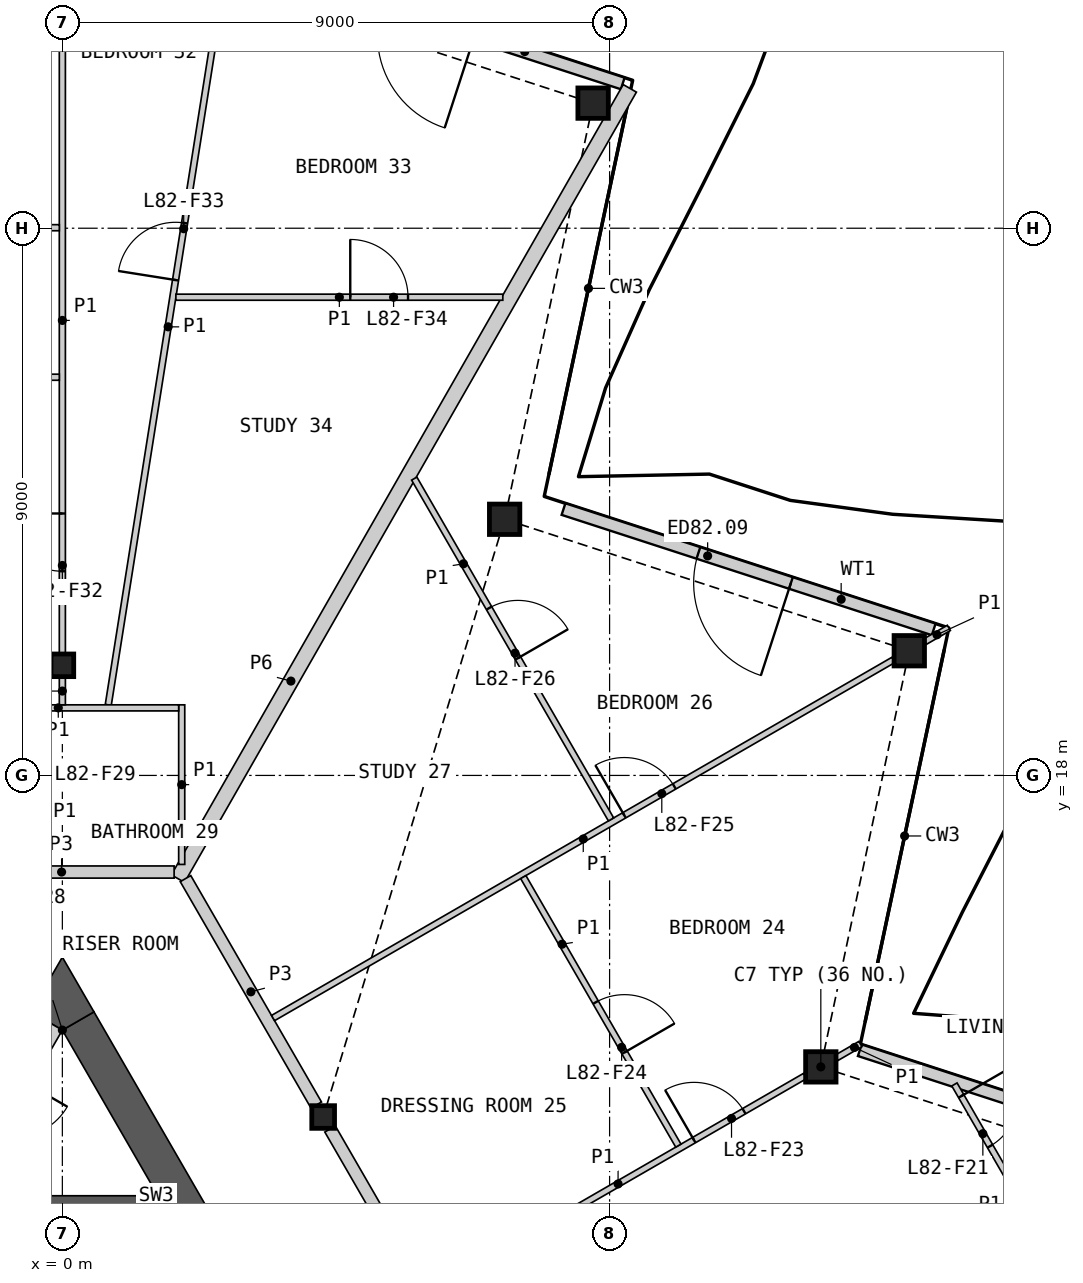
"""IFC4 building model, lengths in metres.
Left out: names, types, materials, properties, quantities, classifications, styles, units other than length and angle.
Written with IfcOpenShell. Run it as: python <this file> out.ifc"""

import sys

from ifc_helpers import new_model, si_unit, direction, frame, frame_2d, origin, origin_2d, place, context, subcontext, project, spatial, polyline, rectangle, hollow_rectangle, i_section, outline, extrude, element, fill, save


model = new_model("IFC4")
c1 = context("Model", 3, precision=1e-05, world=origin(), true_north=direction((0.0, 1.0)))
c2 = subcontext(c1, "Body", "Model", "MODEL_VIEW")
j1 = project(units=[si_unit("LENGTHUNIT", "METRE"), si_unit("PLANEANGLEUNIT", "RADIAN")], contexts=[c1])
p1 = place(None, origin())
s1 = spatial("IfcSite", under=j1, at=p1, CompositionType="ELEMENT")
p2 = place(p1, origin())
s2 = spatial("IfcBuilding", under=s1, at=p2, CompositionType="ELEMENT")
p3 = place(p2, frame((0.0, 0.0, 367.8)))
s3 = spatial("IfcBuildingStorey", under=s2, at=p3, CompositionType="ELEMENT", Elevation=367.8)
for number, where, z_axis, x_axis in (
    (1, (12.474, 13.206, 0.0), (0.0, 0.0, 1.0), (1.0, 0.0, 0.0)),
    (2, (13.929, 20.051, 0.0), (0.0, 0.0, 1.0), (1.0, 0.0, 0.0)),
    (3, (7.274, 22.213, 0.0), (0.0, 0.0, 1.0), (1.0, 0.0, 0.0)),
    (4, (8.729, 29.057, 0.0), (0.0, 0.0, 1.0), (1.0, 0.0, 0.0)),
):
    element("IfcColumn", number, at=place(p3, frame(where, z_axis=z_axis, x_axis=x_axis)), inside=s3, PredefinedType="COLUMN", context=c2, shape_type="SweptSolid", body=[
        extrude(hollow_rectangle(XDim=0.5, YDim=0.5, WallThickness=0.03, at=origin_2d()), origin(), (0.0, 0.0, 1.0), 3.4),
    ])
for number, where, z_axis, x_axis in (
    (5, (0.0, 19.811, 0.0), (0.0, 0.0, 1.0), (1.0, 0.0, 0.0)),
    (6, (4.289, 12.382, 0.0), (0.0, 0.0, 1.0), (1.0, 0.0, 0.0)),
):
    element("IfcColumn", number, at=place(p3, frame(where, z_axis=z_axis, x_axis=x_axis)), inside=s3, PredefinedType="COLUMN", context=c2, shape_type="SweptSolid", body=[
        extrude(i_section(OverallWidth=0.374, OverallDepth=0.372, WebThickness=0.016, FlangeThickness=0.026, at=origin_2d()), origin(), (0.0, 0.0, 1.0), 3.4),
    ])
p4 = place(p3, frame((19.467, 11.416, 0.0), z_axis=(0.0, 0.0, 1.0), x_axis=(-0.951057706878, 0.309013330114, 0.0)))
e7 = element("IfcWall", 7, at=p4, inside=s3, PredefinedType="SOLIDWALL", context=c2, shape_type="SweptSolid", body=[
    extrude(rectangle(XDim=6.678, YDim=0.2, at=frame_2d((3.339, 0.0))), origin(), (0.0, 0.0, 1.0), 2.634),
])
p5 = place(p4, frame((2.402, 0.0, 0.0)))
e8 = element("IfcOpeningElement", 8, at=p5, cuts=e7, PredefinedType="OPENING", context=c2, shape_type="SweptSolid", body=[
    extrude(rectangle(XDim=1.6, YDim=2.25, at=frame_2d((0.8, 1.125))), frame((0.0, 0.11, 0.0), z_axis=(0.0, -1.0, 0.0), x_axis=(1.0, 0.0, 0.0)), (0.0, 0.0, 1.0), 0.22),
])
p6 = place(p3, frame((14.331, 20.402, 0.0), z_axis=(0.0, 0.0, 1.0), x_axis=(-0.951058447414, 0.30901105094, 0.0)))
e9 = element("IfcWall", 9, at=p6, inside=s3, PredefinedType="SOLIDWALL", context=c2, shape_type="SweptSolid", body=[
    extrude(rectangle(XDim=6.402, YDim=0.2, at=frame_2d((3.201, 0.0))), origin(), (0.0, 0.0, 1.0), 2.634),
])
p7 = place(p6, frame((2.469, 0.0, 0.0)))
e10 = element("IfcOpeningElement", 10, at=p7, cuts=e9, PredefinedType="OPENING", context=c2, shape_type="SweptSolid", body=[
    extrude(rectangle(XDim=1.6, YDim=2.25, at=frame_2d((0.8, 1.125))), frame((0.0, 0.11, 0.0), z_axis=(0.0, -1.0, 0.0), x_axis=(1.0, 0.0, 0.0)), (0.0, 0.0, 1.0), 0.22),
])
p8 = place(p3, frame((9.216, 29.381, 0.0), z_axis=(0.0, 0.0, 1.0), x_axis=(-0.951058150748, 0.309011964002, 0.0)))
e11 = element("IfcWall", 11, at=p8, inside=s3, PredefinedType="SOLIDWALL", context=c2, shape_type="SweptSolid", body=[
    extrude(rectangle(XDim=6.779, YDim=0.2, at=frame_2d((3.389, 0.0))), origin(), (0.0, 0.0, 1.0), 2.634),
])
p9 = place(p8, frame((2.559, 0.0, 0.0)))
e12 = element("IfcOpeningElement", 12, at=p9, cuts=e11, PredefinedType="OPENING", context=c2, shape_type="SweptSolid", body=[
    extrude(rectangle(XDim=1.6, YDim=2.25, at=frame_2d((0.8, 1.125))), frame((0.0, 0.11, 0.0), z_axis=(0.0, -1.0, 0.0), x_axis=(1.0, 0.0, 0.0)), (0.0, 0.0, 1.0), 0.22),
])
p10 = place(p3, origin())
e13 = element("IfcWall", 13, at=p10, inside=s3, PredefinedType="SHEAR", context=c2, shape_type="SweptSolid", body=[
    extrude(outline(polyline([(1.544, 5.237), (1.544, 11.087), (1.294, 10.837), (1.294, 5.237), (1.544, 5.237)])), origin(), (0.0, 0.0, 1.0), 3.1),
])
p11 = place(p3, origin())
e14 = element("IfcWall", 14, at=p11, inside=s3, PredefinedType="SHEAR", context=c2, shape_type="SweptSolid", body=[
    extrude(outline(polyline([(1.544, 11.087), (-1.544, 11.087), (-1.294, 10.837), (1.294, 10.837), (1.544, 11.087)])), origin(), (0.0, 0.0, 1.0), 3.1),
])
p12 = place(p3, frame((2.361, 10.322, 0.0), z_axis=(0.0, 0.0, 1.0), x_axis=(-0.500000735859, 0.866024978935, 0.0)))
e15 = element("IfcWall", 15, at=p12, inside=s3, PredefinedType="SHEAR", context=c2, shape_type="SweptSolid", body=[
    extrude(rectangle(XDim=4.202, YDim=0.6, at=frame_2d((2.101, 0.0))), origin(), (0.0, 0.0, 1.0), 3.1),
])
p13 = place(p3, origin())
e16 = element("IfcWall", 16, at=p13, inside=s3, PredefinedType="SHEAR", context=c2, shape_type="SweptSolid", body=[
    extrude(outline(polyline([(0.0, 13.811), (-0.52, 14.111), (0.0, 15.011), (0.52, 14.111), (0.0, 13.811)])), origin(), (0.0, 0.0, 1.0), 3.1),
])
p14 = place(p3, frame((-0.26, 13.961, 0.0), z_axis=(0.0, 0.0, 1.0), x_axis=(-0.49997936161, -0.866037319036, 0.0)))
e17 = element("IfcWall", 17, at=p14, inside=s3, PredefinedType="SHEAR", context=c2, shape_type="SweptSolid", body=[
    extrude(rectangle(XDim=2.66, YDim=0.6, at=frame_2d((1.33, 0.0))), origin(), (0.0, 0.0, 1.0), 3.1),
])
p15 = place(p14, frame((1.05, 0.0, 0.0)))
e18 = element("IfcOpeningElement", 18, at=p15, cuts=e17, PredefinedType="OPENING", context=c2, shape_type="SweptSolid", body=[
    extrude(rectangle(XDim=1.0, YDim=2.1, at=frame_2d((0.5, 1.05))), frame((0.0, 0.31, 0.0), z_axis=(0.0, -1.0, 0.0), x_axis=(1.0, 0.0, 0.0)), (0.0, 0.0, 1.0), 0.62),
])
p16 = place(p3, frame((1.901, 16.302, 0.0), z_axis=(0.0, 0.0, 1.0), x_axis=(0.496368960053, 0.86811166073, 0.0)))
e19 = element("IfcWall", 19, at=p16, inside=s3, PredefinedType="PARTITIONING", context=c2, shape_type="SweptSolid", body=[
    extrude(rectangle(XDim=14.972, YDim=0.25, at=frame_2d((7.486, 0.0))), origin(), (0.0, 0.0, 1.0), 2.33),
])
p17 = place(p3, frame((4.403, 12.185, 0.0), z_axis=(0.0, 0.0, 1.0), x_axis=(0.499992155518, -0.866029932751, 0.0)))
e20 = element("IfcWall", 20, at=p17, inside=s3, PredefinedType="PARTITIONING", context=c2, shape_type="SweptSolid", body=[
    extrude(rectangle(XDim=8.123, YDim=0.2, at=frame_2d((4.062, 0.0))), origin(), (0.0, 0.0, 1.0), 3.1),
])
p18 = place(p17, frame((3.762, 0.0, 0.0)))
e21 = element("IfcOpeningElement", 21, at=p18, cuts=e20, PredefinedType="OPENING", context=c2, shape_type="SweptSolid", body=[
    extrude(rectangle(XDim=1.0, YDim=2.1, at=frame_2d((0.5, 1.05))), frame((0.0, 0.11, 0.0), z_axis=(0.0, -1.0, 0.0), x_axis=(1.0, 0.0, 0.0)), (0.0, 0.0, 1.0), 0.22),
])
p19 = place(p3, frame((2.025, 16.303, 0.0), z_axis=(0.0, 0.0, 1.0), x_axis=(0.500004215162, -0.866022970146, 0.0)))
e22 = element("IfcWall", 22, at=p19, inside=s3, PredefinedType="PARTITIONING", context=c2, shape_type="SweptSolid", body=[
    extrude(rectangle(XDim=4.3, YDim=0.2, at=frame_2d((2.15, 0.0))), origin(), (0.0, 0.0, 1.0), 3.1),
])
p20 = place(p3, frame((-1.863, 16.411, 0.0), z_axis=(0.0, 0.0, 1.0), x_axis=(1.0, 0.0, 0.0)))
e23 = element("IfcWall", 23, at=p20, inside=s3, PredefinedType="PARTITIONING", context=c2, shape_type="SweptSolid", body=[
    extrude(rectangle(XDim=3.701, YDim=0.2, at=frame_2d((1.851, 0.0))), origin(), (0.0, 0.0, 1.0), 3.1),
])
p21 = place(p20, frame((0.25, 0.0, 0.0)))
e24 = element("IfcOpeningElement", 24, at=p21, cuts=e23, PredefinedType="OPENING", context=c2, shape_type="SweptSolid", body=[
    extrude(rectangle(XDim=1.0, YDim=2.1, at=frame_2d((0.5, 1.05))), frame((0.0, 0.11, 0.0), z_axis=(0.0, -1.0, 0.0), x_axis=(1.0, 0.0, 0.0)), (0.0, 0.0, 1.0), 0.22),
])
p22 = place(p3, frame((8.775, 5.066, 0.0), z_axis=(0.0, 0.0, 1.0), x_axis=(0.866023724155, 0.500002909193, 0.0)))
e25 = element("IfcWall", 25, at=p22, inside=s3, PredefinedType="PARTITIONING", context=c2, shape_type="SweptSolid", body=[
    extrude(rectangle(XDim=11.655, YDim=0.2, at=frame_2d((5.827, 0.0))), origin(), (0.0, 0.0, 1.0), 2.33),
])
p23 = place(p3, frame((0.755, 19.16, 0.0), z_axis=(0.0, 0.0, 1.0), x_axis=(0.15643456532, 0.987688324712, 0.0)))
e26 = element("IfcWall", 26, at=p23, inside=s3, PredefinedType="PARTITIONING", context=c2, shape_type="SweptSolid", body=[
    extrude(rectangle(XDim=12.59, YDim=0.1, at=frame_2d((6.295, 0.0))), origin(), (0.0, 0.0, 1.0), 2.33),
])
p24 = place(p23, frame((7.074, 0.0, 0.0)))
e27 = element("IfcOpeningElement", 27, at=p24, cuts=e26, PredefinedType="OPENING", context=c2, shape_type="SweptSolid", body=[
    extrude(rectangle(XDim=0.95, YDim=2.1, at=frame_2d((0.475, 1.05))), frame((0.0, 0.06, 0.0), z_axis=(0.0, -1.0, 0.0), x_axis=(1.0, 0.0, 0.0)), (0.0, 0.0, 1.0), 0.12),
])
p25 = place(p3, frame((3.465, 14.01, 0.0), z_axis=(0.0, 0.0, 1.0), x_axis=(0.866032376801, 0.499987922186, 0.0)))
e28 = element("IfcWall", 28, at=p25, inside=s3, PredefinedType="PARTITIONING", context=c2, shape_type="SweptSolid", body=[
    extrude(rectangle(XDim=11.782, YDim=0.1, at=frame_2d((5.891, 0.0))), origin(), (0.0, 0.0, 1.0), 2.33),
])
p26 = place(p25, frame((6.67, 0.0, 0.0)))
e29 = element("IfcOpeningElement", 29, at=p26, cuts=e28, PredefinedType="OPENING", context=c2, shape_type="SweptSolid", body=[
    extrude(rectangle(XDim=0.95, YDim=2.1, at=frame_2d((0.475, 1.05))), frame((0.0, 0.06, 0.0), z_axis=(0.0, -1.0, 0.0), x_axis=(1.0, 0.0, 0.0)), (0.0, 0.0, 1.0), 0.12),
])
p27 = place(p3, frame((0.0, 20.008, 0.0), z_axis=(0.0, 0.0, 1.0), x_axis=(0.0, 1.0, 0.0)))
e30 = element("IfcWall", 30, at=p27, inside=s3, PredefinedType="PARTITIONING", context=c2, shape_type="SweptSolid", body=[
    extrude(rectangle(XDim=10.951, YDim=0.1, at=frame_2d((5.476, 0.0))), origin(), (0.0, 0.0, 1.0), 2.33),
])
p28 = place(p27, frame((1.35, 0.0, 0.0)))
e31 = element("IfcOpeningElement", 31, at=p28, cuts=e30, PredefinedType="OPENING", context=c2, shape_type="SweptSolid", body=[
    extrude(rectangle(XDim=0.95, YDim=2.1, at=frame_2d((0.475, 1.05))), frame((0.0, 0.06, 0.0), z_axis=(0.0, -1.0, 0.0), x_axis=(1.0, 0.0, 0.0)), (0.0, 0.0, 1.0), 0.12),
])
p29 = place(p3, frame((-7.922, 27.009, 0.0), z_axis=(0.0, 0.0, 1.0), x_axis=(1.0, 0.0, 0.0)))
e32 = element("IfcWall", 32, at=p29, inside=s3, PredefinedType="PARTITIONING", context=c2, shape_type="SweptSolid", body=[
    extrude(rectangle(XDim=7.872, YDim=0.1, at=frame_2d((3.936, 0.0))), origin(), (0.0, 0.0, 1.0), 2.33),
])
p30 = place(p29, frame((3.762, 0.0, 0.0)))
e33 = element("IfcOpeningElement", 33, at=p30, cuts=e32, PredefinedType="OPENING", context=c2, shape_type="SweptSolid", body=[
    extrude(rectangle(XDim=0.95, YDim=2.1, at=frame_2d((0.475, 1.05))), frame((0.0, 0.06, 0.0), z_axis=(0.0, -1.0, 0.0), x_axis=(1.0, 0.0, 0.0)), (0.0, 0.0, 1.0), 0.12),
])
p31 = place(p3, frame((6.065, 9.506, 0.0), z_axis=(0.0, 0.0, 1.0), x_axis=(0.866018949465, 0.500011179042, 0.0)))
e34 = element("IfcWall", 34, at=p31, inside=s3, PredefinedType="PARTITIONING", context=c2, shape_type="SweptSolid", body=[
    extrude(rectangle(XDim=7.1, YDim=0.1, at=frame_2d((3.55, 0.0))), origin(), (0.0, 0.0, 1.0), 2.33),
])
p32 = place(p31, frame((4.992, 0.0, 0.0)))
e35 = element("IfcOpeningElement", 35, at=p32, cuts=e34, PredefinedType="OPENING", context=c2, shape_type="SweptSolid", body=[
    extrude(rectangle(XDim=0.95, YDim=2.1, at=frame_2d((0.475, 1.05))), frame((0.0, 0.06, 0.0), z_axis=(0.0, -1.0, 0.0), x_axis=(1.0, 0.0, 0.0)), (0.0, 0.0, 1.0), 0.12),
])
p33 = place(p3, frame((5.787, 22.882, 0.0), z_axis=(0.0, 0.0, 1.0), x_axis=(0.500001069878, -0.866024786089, 0.0)))
e36 = element("IfcWall", 36, at=p33, inside=s3, PredefinedType="PARTITIONING", context=c2, shape_type="SweptSolid", body=[
    extrude(rectangle(XDim=6.473, YDim=0.1, at=frame_2d((3.236, 0.0))), origin(), (0.0, 0.0, 1.0), 2.33),
])
p34 = place(p33, frame((2.46, 0.0, 0.0)))
e37 = element("IfcOpeningElement", 37, at=p34, cuts=e36, PredefinedType="OPENING", context=c2, shape_type="SweptSolid", body=[
    extrude(rectangle(XDim=0.95, YDim=2.1, at=frame_2d((0.475, 1.05))), frame((0.0, 0.06, 0.0), z_axis=(0.0, -1.0, 0.0), x_axis=(1.0, 0.0, 0.0)), (0.0, 0.0, 1.0), 0.12),
])
p35 = place(p3, frame((-6.516, 24.549, 0.0), z_axis=(0.0, 0.0, 1.0), x_axis=(1.0, 0.0, 0.0)))
e38 = element("IfcWall", 38, at=p35, inside=s3, PredefinedType="PARTITIONING", context=c2, shape_type="SweptSolid", body=[
    extrude(rectangle(XDim=6.466, YDim=0.1, at=frame_2d((3.233, 0.0))), origin(), (0.0, 0.0, 1.0), 2.33),
])
p36 = place(p35, frame((3.46, 0.0, 0.0)))
e39 = element("IfcOpeningElement", 39, at=p36, cuts=e38, PredefinedType="OPENING", context=c2, shape_type="SweptSolid", body=[
    extrude(rectangle(XDim=0.95, YDim=2.1, at=frame_2d((0.475, 1.05))), frame((0.0, 0.06, 0.0), z_axis=(0.0, -1.0, 0.0), x_axis=(1.0, 0.0, 0.0)), (0.0, 0.0, 1.0), 0.12),
])
p37 = place(p3, frame((1.867, 25.865, 0.0), z_axis=(0.0, 0.0, 1.0), x_axis=(1.0, 0.0, 0.0)))
e40 = element("IfcWall", 40, at=p37, inside=s3, PredefinedType="PARTITIONING", context=c2, shape_type="SweptSolid", body=[
    extrude(rectangle(XDim=5.376, YDim=0.1, at=frame_2d((2.688, 0.0))), origin(), (0.0, 0.0, 1.0), 2.33),
])
p38 = place(p37, frame((2.868, 0.0, 0.0)))
e41 = element("IfcOpeningElement", 41, at=p38, cuts=e40, PredefinedType="OPENING", context=c2, shape_type="SweptSolid", body=[
    extrude(rectangle(XDim=0.95, YDim=2.1, at=frame_2d((0.475, 1.05))), frame((0.0, 0.06, 0.0), z_axis=(0.0, -1.0, 0.0), x_axis=(1.0, 0.0, 0.0)), (0.0, 0.0, 1.0), 0.12),
])
p39 = place(p3, frame((7.581, 16.328, 0.0), z_axis=(0.0, 0.0, 1.0), x_axis=(0.500005610874, -0.86602216432, 0.0)))
e42 = element("IfcWall", 42, at=p39, inside=s3, PredefinedType="PARTITIONING", context=c2, shape_type="SweptSolid", body=[
    extrude(rectangle(XDim=5.1, YDim=0.1, at=frame_2d((2.55, 0.0))), origin(), (0.0, 0.0, 1.0), 2.33),
])
p40 = place(p39, frame((2.379, 0.0, 0.0)))
e43 = element("IfcOpeningElement", 43, at=p40, cuts=e42, PredefinedType="OPENING", context=c2, shape_type="SweptSolid", body=[
    extrude(rectangle(XDim=0.95, YDim=2.1, at=frame_2d((0.475, 1.05))), frame((0.0, 0.06, 0.0), z_axis=(0.0, -1.0, 0.0), x_axis=(1.0, 0.0, 0.0)), (0.0, 0.0, 1.0), 0.12),
])
p41 = place(p3, frame((14.671, 12.918, 0.0), z_axis=(0.0, 0.0, 1.0), x_axis=(0.499981580887, -0.866036037803, 0.0)))
e44 = element("IfcWall", 44, at=p41, inside=s3, PredefinedType="PARTITIONING", context=c2, shape_type="SweptSolid", body=[
    extrude(rectangle(XDim=3.752, YDim=0.1, at=frame_2d((1.876, 0.0))), origin(), (0.0, 0.0, 1.0), 2.33),
])
p42 = place(p41, frame((0.222, 0.0, 0.0)))
e45 = element("IfcOpeningElement", 45, at=p42, cuts=e44, PredefinedType="OPENING", context=c2, shape_type="SweptSolid", body=[
    extrude(rectangle(XDim=0.95, YDim=2.1, at=frame_2d((0.475, 1.05))), frame((0.0, 0.06, 0.0), z_axis=(0.0, -1.0, 0.0), x_axis=(1.0, 0.0, 0.0)), (0.0, 0.0, 1.0), 0.12),
])
p43 = place(p3, frame((1.963, 16.536, 0.0), z_axis=(0.0, 0.0, 1.0), x_axis=(0.0, 1.0, 0.0)))
e46 = element("IfcWall", 46, at=p43, inside=s3, PredefinedType="PARTITIONING", context=c2, shape_type="SweptSolid", body=[
    extrude(rectangle(XDim=2.625, YDim=0.1, at=frame_2d((1.312, 0.0))), origin(), (0.0, 0.0, 1.0), 2.33),
])
p44 = place(p3, frame((-0.287, 19.111, 0.0), z_axis=(0.0, 0.0, 1.0), x_axis=(1.0, 0.0, 0.0)))
e47 = element("IfcWall", 47, at=p44, inside=s3, PredefinedType="PARTITIONING", context=c2, shape_type="SweptSolid", body=[
    extrude(rectangle(XDim=2.2, YDim=0.1, at=frame_2d((1.1, 0.0))), origin(), (0.0, 0.0, 1.0), 2.33),
])
p45 = place(p3, frame((0.0, 19.161, 0.0), z_axis=(0.0, 0.0, 1.0), x_axis=(0.0, 1.0, 0.0)))
e48 = element("IfcWall", 48, at=p45, inside=s3, PredefinedType="PARTITIONING", context=c2, shape_type="SweptSolid", body=[
    extrude(rectangle(XDim=0.453, YDim=0.1, at=frame_2d((0.227, 0.0))), origin(), (0.0, 0.0, 1.0), 2.33),
])
for number, where, z_axis, x_axis in (
    (49, (14.189, 20.201, 0.0), (0.0, 0.0, 1.0), (0.866, 0.5, 0.0)),
    (50, (12.734, 13.356, 0.0), (0.0, 0.0, 1.0), (0.866, 0.5, 0.0)),
):
    element("IfcWall", number, at=place(p3, frame(where, z_axis=z_axis, x_axis=x_axis)), inside=s3, PredefinedType="PARTITIONING", context=c2, shape_type="SweptSolid", body=[
        extrude(rectangle(XDim=0.451, YDim=0.1, at=frame_2d((0.226, 0.0))), origin(), (0.0, 0.0, 1.0), 2.33),
    ])
p46 = place(p7, origin())
e51 = element("IfcDoor", 51, at=p46, inside=s3, OperationType="DOUBLE_DOOR_SINGLE_SWING", PredefinedType="DOOR", context=c2, shape_type="SweptSolid", body=[
    extrude(rectangle(XDim=1.6, YDim=2.25, at=frame_2d((0.8, 1.125))), frame((0.0, 0.025, 0.0), z_axis=(0.0, -1.0, 0.0), x_axis=(1.0, 0.0, 0.0)), (0.0, 0.0, 1.0), 0.05),
])
fill(e10, e51)
p47 = place(p42, origin())
e52 = element("IfcDoor", 52, at=p47, inside=s3, OperationType="SINGLE_SWING_LEFT", PredefinedType="DOOR", context=c2, shape_type="SweptSolid", body=[
    extrude(rectangle(XDim=0.95, YDim=2.1, at=frame_2d((0.475, 1.05))), frame((0.0, 0.025, 0.0), z_axis=(0.0, -1.0, 0.0), x_axis=(1.0, 0.0, 0.0)), (0.0, 0.0, 1.0), 0.05),
])
fill(e45, e52)
p48 = place(p32, origin())
e53 = element("IfcDoor", 53, at=p48, inside=s3, OperationType="SINGLE_SWING_LEFT", PredefinedType="DOOR", context=c2, shape_type="SweptSolid", body=[
    extrude(rectangle(XDim=0.95, YDim=2.1, at=frame_2d((0.475, 1.05))), frame((0.0, 0.025, 0.0), z_axis=(0.0, -1.0, 0.0), x_axis=(1.0, 0.0, 0.0)), (0.0, 0.0, 1.0), 0.05),
])
fill(e35, e53)
p49 = place(p40, origin())
e54 = element("IfcDoor", 54, at=p49, inside=s3, OperationType="SINGLE_SWING_RIGHT", PredefinedType="DOOR", context=c2, shape_type="SweptSolid", body=[
    extrude(rectangle(XDim=0.95, YDim=2.1, at=frame_2d((0.475, 1.05))), frame((0.0, 0.025, 0.0), z_axis=(0.0, -1.0, 0.0), x_axis=(1.0, 0.0, 0.0)), (0.0, 0.0, 1.0), 0.05),
])
fill(e43, e54)
p50 = place(p26, origin())
e55 = element("IfcDoor", 55, at=p50, inside=s3, OperationType="SINGLE_SWING_LEFT", PredefinedType="DOOR", context=c2, shape_type="SweptSolid", body=[
    extrude(rectangle(XDim=0.95, YDim=2.1, at=frame_2d((0.475, 1.05))), frame((0.0, 0.025, 0.0), z_axis=(0.0, -1.0, 0.0), x_axis=(1.0, 0.0, 0.0)), (0.0, 0.0, 1.0), 0.05),
])
fill(e29, e55)
p51 = place(p34, origin())
e56 = element("IfcDoor", 56, at=p51, inside=s3, OperationType="SINGLE_SWING_RIGHT", PredefinedType="DOOR", context=c2, shape_type="SweptSolid", body=[
    extrude(rectangle(XDim=0.95, YDim=2.1, at=frame_2d((0.475, 1.05))), frame((0.0, 0.025, 0.0), z_axis=(0.0, -1.0, 0.0), x_axis=(1.0, 0.0, 0.0)), (0.0, 0.0, 1.0), 0.05),
])
fill(e37, e56)
p52 = place(p28, origin())
e57 = element("IfcDoor", 57, at=p52, inside=s3, OperationType="SINGLE_SWING_RIGHT", PredefinedType="DOOR", context=c2, shape_type="SweptSolid", body=[
    extrude(rectangle(XDim=0.95, YDim=2.1, at=frame_2d((0.475, 1.05))), frame((0.0, 0.025, 0.0), z_axis=(0.0, -1.0, 0.0), x_axis=(1.0, 0.0, 0.0)), (0.0, 0.0, 1.0), 0.05),
])
fill(e31, e57)
p53 = place(p24, origin())
e58 = element("IfcDoor", 58, at=p53, inside=s3, OperationType="SINGLE_SWING_LEFT", PredefinedType="DOOR", context=c2, shape_type="SweptSolid", body=[
    extrude(rectangle(XDim=0.95, YDim=2.1, at=frame_2d((0.475, 1.05))), frame((0.0, 0.025, 0.0), z_axis=(0.0, -1.0, 0.0), x_axis=(1.0, 0.0, 0.0)), (0.0, 0.0, 1.0), 0.05),
])
fill(e27, e58)
p54 = place(p38, origin())
e59 = element("IfcDoor", 59, at=p54, inside=s3, OperationType="SINGLE_SWING_LEFT", PredefinedType="DOOR", context=c2, shape_type="SweptSolid", body=[
    extrude(rectangle(XDim=0.95, YDim=2.1, at=frame_2d((0.475, 1.05))), frame((0.0, 0.025, 0.0), z_axis=(0.0, -1.0, 0.0), x_axis=(1.0, 0.0, 0.0)), (0.0, 0.0, 1.0), 0.05),
])
fill(e41, e59)
save(model, sys.argv[1])
